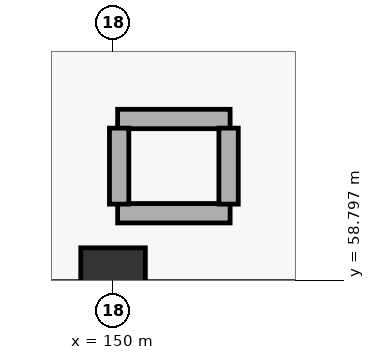
"""IFC4 building model, lengths in metres.
Left out: names, types, materials, properties, quantities, classifications, styles, units other than length and angle.
Written with IfcOpenShell. Run it as: python <this file> out.ifc"""

import sys

from ifc_helpers import new_model, si_unit, direction, frame, frame_2d, origin, origin_2d, place, context, subcontext, project, spatial, rectangle, extrude, element, save


model = new_model("IFC4")
c1 = context("Model", 3, precision=1e-05, world=origin(), true_north=direction((0.0, 1.0)))
c2 = subcontext(c1, "Body", "Model", "MODEL_VIEW")
j1 = project(units=[si_unit("LENGTHUNIT", "METRE"), si_unit("PLANEANGLEUNIT", "RADIAN")], contexts=[c1])
p1 = place(None, origin())
s1 = spatial("IfcSite", under=j1, at=p1, CompositionType="ELEMENT")
p2 = place(p1, origin())
s2 = spatial("IfcBuilding", under=s1, at=p2, CompositionType="ELEMENT")
p3 = place(p2, frame((0.0, 0.0, 5.4)))
s3 = spatial("IfcBuildingStorey", under=s2, at=p3, CompositionType="ELEMENT", Elevation=5.4)
p4 = place(p3, frame((150.0, 58.8, 0.0), z_axis=(0.0, 0.0, 1.0), x_axis=(1.0, 0.0, 0.0)))
e1 = element("IfcColumn", 1, at=p4, inside=s3, PredefinedType="COLUMN", context=c2, shape_type="SweptSolid", body=[
    extrude(rectangle(XDim=0.85, YDim=0.85, at=origin_2d()), origin(), (0.0, 0.0, 1.0), 5.1),
])
for number, where, z_axis, x_axis in (
    (2, (150.06, 60.92, 0.0), (0.0, 0.0, 1.0), (1.0, 0.0, 0.0)),
    (3, (150.06, 59.68, 0.0), (0.0, 0.0, 1.0), (1.0, 0.0, 0.0)),
):
    element("IfcWall", number, at=place(p3, frame(where, z_axis=z_axis, x_axis=x_axis)), inside=s3, PredefinedType="PARTITIONING", context=c2, shape_type="SweptSolid", body=[
        extrude(rectangle(XDim=1.48, YDim=0.255, at=frame_2d((0.74, 0.0))), origin(), (0.0, 0.0, 1.0), 3.77),
    ])
p5 = place(p3, frame((150.08, 59.8, 0.0), z_axis=(0.0, 0.0, 1.0), x_axis=(0.0, 1.0, 0.0)))
e4 = element("IfcWall", 4, at=p5, inside=s3, PredefinedType="PARTITIONING", context=c2, shape_type="SweptSolid", body=[
    extrude(rectangle(XDim=1.0, YDim=0.255, at=frame_2d((0.5, 0.0))), origin(), (0.0, 0.0, 1.0), 3.77),
])
p6 = place(p3, frame((151.52, 59.8, 0.0), z_axis=(0.0, 0.0, 1.0), x_axis=(0.0, 1.0, 0.0)))
e5 = element("IfcWall", 5, at=p6, inside=s3, PredefinedType="PARTITIONING", context=c2, shape_type="SweptSolid", body=[
    extrude(rectangle(XDim=1.0, YDim=0.255, at=frame_2d((0.5, 0.0))), origin(), (0.0, 0.0, 1.0), 4.72),
])
save(model, sys.argv[1])
